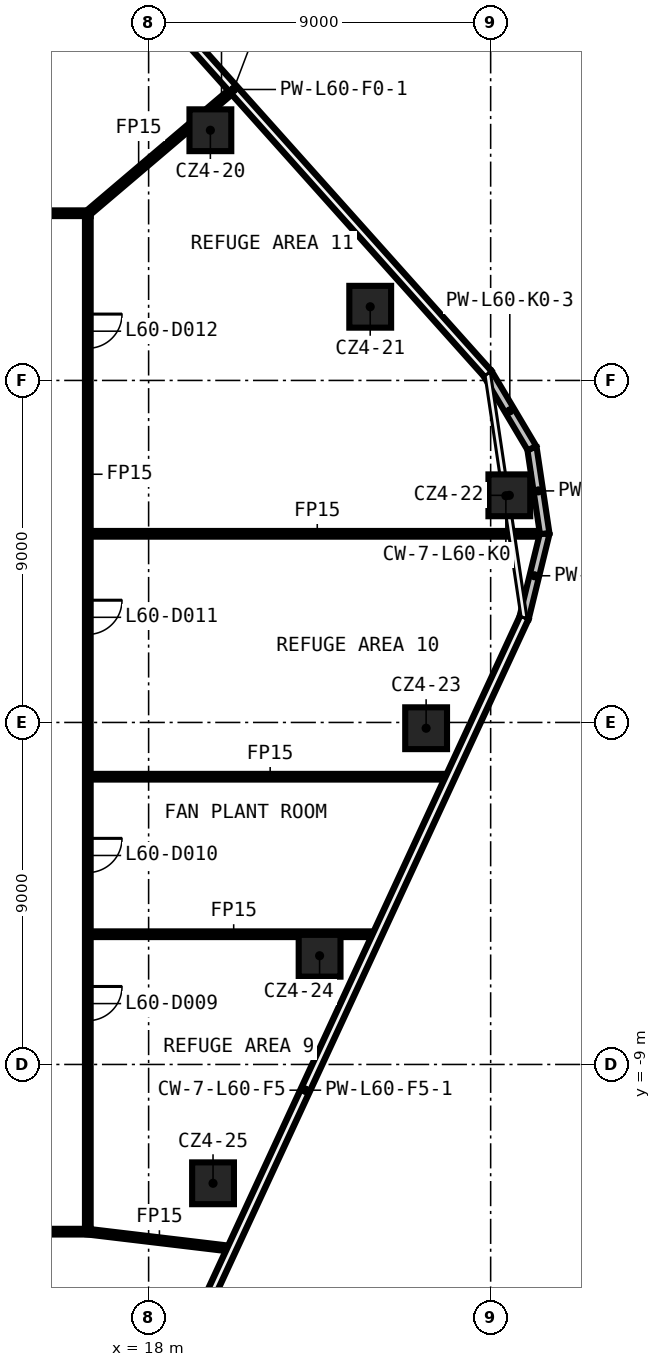
"""IFC4 building model, lengths in metres.
Left out: names, types, materials, properties, quantities, classifications, styles, units other than length and angle.
Written with IfcOpenShell. Run it as: python <this file> out.ifc"""

import sys

from ifc_helpers import new_model, si_unit, direction, frame, frame_2d, origin, origin_2d, place, context, subcontext, project, spatial, rectangle, extrude, element, fill, save


model = new_model("IFC4")
c1 = context("Model", 3, precision=1e-05, world=origin(), true_north=direction((0.0, 1.0)))
c2 = subcontext(c1, "Body", "Model", "MODEL_VIEW")
j1 = project(units=[si_unit("LENGTHUNIT", "METRE"), si_unit("PLANEANGLEUNIT", "RADIAN")], contexts=[c1])
p1 = place(None, origin())
s1 = spatial("IfcSite", under=j1, at=p1, CompositionType="ELEMENT")
p2 = place(p1, origin())
s2 = spatial("IfcBuilding", under=s1, at=p2, CompositionType="ELEMENT")
p3 = place(p2, frame((0.0, 0.0, 283.2)))
s3 = spatial("IfcBuildingStorey", under=s2, at=p3, CompositionType="ELEMENT", Elevation=283.2)
for number, where, z_axis, x_axis in (
    (1, (19.625, 15.584, 0.0), (0.0, 0.0, 1.0), (1.0, 0.0, 0.0)),
    (2, (23.831, 10.939, 0.0), (0.0, 0.0, 1.0), (1.0, 0.0, 0.0)),
    (3, (27.492, 5.977, 0.0), (0.0, 0.0, 1.0), (1.0, 0.0, 0.0)),
    (4, (25.302, -0.152, 0.0), (0.0, 0.0, 1.0), (1.0, 0.0, 0.0)),
    (5, (22.499, -6.139, 0.0), (0.0, 0.0, 1.0), (1.0, 0.0, 0.0)),
    (6, (19.695, -12.127, 0.0), (0.0, 0.0, 1.0), (1.0, 0.0, 0.0)),
):
    element("IfcColumn", number, at=place(p3, frame(where, z_axis=z_axis, x_axis=x_axis)), inside=s3, PredefinedType="COLUMN", context=c2, shape_type="SweptSolid", body=[
        extrude(rectangle(XDim=1.1, YDim=1.1, at=origin_2d()), origin(), (0.0, 0.0, 1.0), 5.55),
    ])
p4 = place(p3, frame((16.475, -13.4, 0.0), z_axis=(0.0, 0.0, 1.0), x_axis=(-1.0, 0.0, 0.0)))
e7 = element("IfcWall", 7, at=p4, inside=s3, PredefinedType="PARTITIONING", context=c2, shape_type="SweptSolid", body=[
    extrude(rectangle(XDim=32.95, YDim=0.15, at=frame_2d((16.475, 0.0))), origin(), (0.0, 0.0, 1.0), 5.55),
])
p5 = place(p4, frame((30.159, 0.0, 0.0)))
e8 = element("IfcOpeningElement", 8, at=p5, cuts=e7, PredefinedType="OPENING", context=c2, shape_type="SweptSolid", body=[
    extrude(rectangle(XDim=0.9, YDim=2.1, at=frame_2d((0.45, 1.05))), frame((0.0, 0.085, 0.0), z_axis=(0.0, -1.0, 0.0), x_axis=(1.0, 0.0, 0.0)), (0.0, 0.0, 1.0), 0.17),
])
p6 = place(p4, frame((24.091, 0.0, 0.0)))
e9 = element("IfcOpeningElement", 9, at=p6, cuts=e7, PredefinedType="OPENING", context=c2, shape_type="SweptSolid", body=[
    extrude(rectangle(XDim=0.9, YDim=2.1, at=frame_2d((0.45, 1.05))), frame((0.0, 0.085, 0.0), z_axis=(0.0, -1.0, 0.0), x_axis=(1.0, 0.0, 0.0)), (0.0, 0.0, 1.0), 0.17),
])
p7 = place(p4, frame((17.454, 0.0, 0.0)))
e10 = element("IfcOpeningElement", 10, at=p7, cuts=e7, PredefinedType="OPENING", context=c2, shape_type="SweptSolid", body=[
    extrude(rectangle(XDim=0.9, YDim=2.1, at=frame_2d((0.45, 1.05))), frame((0.0, 0.085, 0.0), z_axis=(0.0, -1.0, 0.0), x_axis=(1.0, 0.0, 0.0)), (0.0, 0.0, 1.0), 0.17),
])
p8 = place(p4, frame((12.504, 0.0, 0.0)))
e11 = element("IfcOpeningElement", 11, at=p8, cuts=e7, PredefinedType="OPENING", context=c2, shape_type="SweptSolid", body=[
    extrude(rectangle(XDim=0.9, YDim=2.1, at=frame_2d((0.45, 1.05))), frame((0.0, 0.085, 0.0), z_axis=(0.0, -1.0, 0.0), x_axis=(1.0, 0.0, 0.0)), (0.0, 0.0, 1.0), 0.17),
])
p9 = place(p4, frame((7.554, 0.0, 0.0)))
e12 = element("IfcOpeningElement", 12, at=p9, cuts=e7, PredefinedType="OPENING", context=c2, shape_type="SweptSolid", body=[
    extrude(rectangle(XDim=0.9, YDim=2.1, at=frame_2d((0.45, 1.05))), frame((0.0, 0.085, 0.0), z_axis=(0.0, -1.0, 0.0), x_axis=(1.0, 0.0, 0.0)), (0.0, 0.0, 1.0), 0.17),
])
p10 = place(p4, frame((2.438, 0.0, 0.0)))
e13 = element("IfcOpeningElement", 13, at=p10, cuts=e7, PredefinedType="OPENING", context=c2, shape_type="SweptSolid", body=[
    extrude(rectangle(XDim=0.9, YDim=2.1, at=frame_2d((0.45, 1.05))), frame((0.0, 0.085, 0.0), z_axis=(0.0, -1.0, 0.0), x_axis=(1.0, 0.0, 0.0)), (0.0, 0.0, 1.0), 0.17),
])
p11 = place(p3, frame((16.475, -5.573, 0.0), z_axis=(0.0, 0.0, 1.0), x_axis=(1.0, 0.0, 0.0)))
e14 = element("IfcWall", 14, at=p11, inside=s3, PredefinedType="PARTITIONING", context=c2, shape_type="SweptSolid", body=[
    extrude(rectangle(XDim=7.527, YDim=0.15, at=frame_2d((3.763, 0.0))), origin(), (0.0, 0.0, 1.0), 5.55),
])
p12 = place(p3, frame((16.475, -1.428, 0.0), z_axis=(0.0, 0.0, 1.0), x_axis=(1.0, 0.0, 0.0)))
e15 = element("IfcWall", 15, at=p12, inside=s3, PredefinedType="PARTITIONING", context=c2, shape_type="SweptSolid", body=[
    extrude(rectangle(XDim=9.447, YDim=0.15, at=frame_2d((4.723, 0.0))), origin(), (0.0, 0.0, 1.0), 5.55),
])
p13 = place(p3, frame((16.475, 4.964, 0.0), z_axis=(0.0, 0.0, 1.0), x_axis=(1.0, 0.0, 0.0)))
e16 = element("IfcWall", 16, at=p13, inside=s3, PredefinedType="PARTITIONING", context=c2, shape_type="SweptSolid", body=[
    extrude(rectangle(XDim=11.925, YDim=0.15, at=frame_2d((5.963, 0.0))), origin(), (0.0, 0.0, 1.0), 5.55),
])
p14 = place(p3, frame((-16.475, 13.4, 0.0), z_axis=(0.0, 0.0, 1.0), x_axis=(1.0, 0.0, 0.0)))
e17 = element("IfcWall", 17, at=p14, inside=s3, PredefinedType="PARTITIONING", context=c2, shape_type="SweptSolid", body=[
    extrude(rectangle(XDim=32.95, YDim=0.15, at=frame_2d((16.475, 0.0))), origin(), (0.0, 0.0, 1.0), 5.55),
])
p15 = place(p14, frame((23.297, 0.0, 0.0)))
e18 = element("IfcOpeningElement", 18, at=p15, cuts=e17, PredefinedType="OPENING", context=c2, shape_type="SweptSolid", body=[
    extrude(rectangle(XDim=0.9, YDim=2.1, at=frame_2d((0.45, 1.05))), frame((0.0, 0.085, 0.0), z_axis=(0.0, -1.0, 0.0), x_axis=(1.0, 0.0, 0.0)), (0.0, 0.0, 1.0), 0.17),
])
p16 = place(p14, frame((17.452, 0.0, 0.0)))
e19 = element("IfcOpeningElement", 19, at=p16, cuts=e17, PredefinedType="OPENING", context=c2, shape_type="SweptSolid", body=[
    extrude(rectangle(XDim=0.9, YDim=2.1, at=frame_2d((0.45, 1.05))), frame((0.0, 0.085, 0.0), z_axis=(0.0, -1.0, 0.0), x_axis=(1.0, 0.0, 0.0)), (0.0, 0.0, 1.0), 0.17),
])
p17 = place(p14, frame((14.179, 0.0, 0.0)))
e20 = element("IfcOpeningElement", 20, at=p17, cuts=e17, PredefinedType="OPENING", context=c2, shape_type="SweptSolid", body=[
    extrude(rectangle(XDim=0.9, YDim=2.1, at=frame_2d((0.45, 1.05))), frame((0.0, 0.085, 0.0), z_axis=(0.0, -1.0, 0.0), x_axis=(1.0, 0.0, 0.0)), (0.0, 0.0, 1.0), 0.17),
])
p18 = place(p14, frame((7.517, 0.0, 0.0)))
e21 = element("IfcOpeningElement", 21, at=p18, cuts=e17, PredefinedType="OPENING", context=c2, shape_type="SweptSolid", body=[
    extrude(rectangle(XDim=0.9, YDim=2.1, at=frame_2d((0.45, 1.05))), frame((0.0, 0.085, 0.0), z_axis=(0.0, -1.0, 0.0), x_axis=(1.0, 0.0, 0.0)), (0.0, 0.0, 1.0), 0.17),
])
p19 = place(p3, frame((16.4, 13.4, 0.0), z_axis=(0.0, 0.0, 1.0), x_axis=(0.761994228547, 0.647583813618, 0.0)))
e22 = element("IfcWall", 22, at=p19, inside=s3, PredefinedType="PARTITIONING", context=c2, shape_type="SweptSolid", body=[
    extrude(rectangle(XDim=3.51, YDim=0.15, at=frame_2d((1.755, 0.0))), origin(), (0.0, 0.0, 1.0), 5.55),
])
p20 = place(p3, frame((19.617, 16.134, 0.0), z_axis=(0.0, 0.0, 1.0), x_axis=(0.762069188158, 0.647495600341, 0.0)))
e23 = element("IfcWall", 23, at=p20, inside=s3, PredefinedType="PARTITIONING", context=c2, shape_type="SweptSolid", body=[
    extrude(rectangle(XDim=0.788, YDim=0.15, at=frame_2d((0.394, 0.0))), origin(), (0.0, 0.0, 1.0), 5.55),
])
p21 = place(p3, frame((16.4, 13.325, 0.0), z_axis=(0.0, 0.0, 1.0), x_axis=(0.0, -1.0, 0.0)))
e24 = element("IfcWall", 24, at=p21, inside=s3, PredefinedType="PARTITIONING", context=c2, shape_type="SweptSolid", body=[
    extrude(rectangle(XDim=26.65, YDim=0.15, at=frame_2d((13.325, 0.0))), origin(), (0.0, 0.0, 1.0), 5.55),
])
p22 = place(p21, frame((20.273, 0.0, 0.0)))
e25 = element("IfcOpeningElement", 25, at=p22, cuts=e24, PredefinedType="OPENING", context=c2, shape_type="SweptSolid", body=[
    extrude(rectangle(XDim=0.9, YDim=2.1, at=frame_2d((0.45, 1.05))), frame((0.0, 0.085, 0.0), z_axis=(0.0, -1.0, 0.0), x_axis=(1.0, 0.0, 0.0)), (0.0, 0.0, 1.0), 0.17),
])
p23 = place(p21, frame((16.375, 0.0, 0.0)))
e26 = element("IfcOpeningElement", 26, at=p23, cuts=e24, PredefinedType="OPENING", context=c2, shape_type="SweptSolid", body=[
    extrude(rectangle(XDim=0.9, YDim=2.1, at=frame_2d((0.45, 1.05))), frame((0.0, 0.085, 0.0), z_axis=(0.0, -1.0, 0.0), x_axis=(1.0, 0.0, 0.0)), (0.0, 0.0, 1.0), 0.17),
])
p24 = place(p21, frame((10.108, 0.0, 0.0)))
e27 = element("IfcOpeningElement", 27, at=p24, cuts=e24, PredefinedType="OPENING", context=c2, shape_type="SweptSolid", body=[
    extrude(rectangle(XDim=0.9, YDim=2.1, at=frame_2d((0.45, 1.05))), frame((0.0, 0.085, 0.0), z_axis=(0.0, -1.0, 0.0), x_axis=(1.0, 0.0, 0.0)), (0.0, 0.0, 1.0), 0.17),
])
p25 = place(p21, frame((2.579, 0.0, 0.0)))
e28 = element("IfcOpeningElement", 28, at=p25, cuts=e24, PredefinedType="OPENING", context=c2, shape_type="SweptSolid", body=[
    extrude(rectangle(XDim=0.9, YDim=2.1, at=frame_2d((0.45, 1.05))), frame((0.0, 0.085, 0.0), z_axis=(0.0, -1.0, 0.0), x_axis=(1.0, 0.0, 0.0)), (0.0, 0.0, 1.0), 0.17),
])
p26 = place(p3, frame((16.4, -13.4, 0.0), z_axis=(0.0, 0.0, 1.0), x_axis=(0.992945775756, -0.118569331652, 0.0)))
e29 = element("IfcWall", 29, at=p26, inside=s3, PredefinedType="PARTITIONING", context=c2, shape_type="SweptSolid", body=[
    extrude(rectangle(XDim=3.795, YDim=0.15, at=frame_2d((1.897, 0.0))), origin(), (0.0, 0.0, 1.0), 5.55),
])
p27 = place(p3, frame((27.88, 2.751, 0.0), z_axis=(0.0, 0.0, 1.0), x_axis=(0.237500178982, 0.971387494764, 0.0)))
e30 = element("IfcWall", 30, at=p27, inside=s3, PredefinedType="SOLIDWALL", context=c2, shape_type="SweptSolid", body=[
    extrude(rectangle(XDim=2.283, YDim=0.25, at=frame_2d((1.142, 0.0))), origin(), (0.0, 0.0, 1.0), 5.55),
])
p28 = place(p3, frame((28.422, 4.969, 0.0), z_axis=(0.0, 0.0, 1.0), x_axis=(-0.147358250541, 0.989083184569, 0.0)))
e31 = element("IfcWall", 31, at=p28, inside=s3, PredefinedType="SOLIDWALL", context=c2, shape_type="SweptSolid", body=[
    extrude(rectangle(XDim=2.273, YDim=0.25, at=frame_2d((1.137, 0.0))), origin(), (0.0, 0.0, 1.0), 5.55),
])
p29 = place(p3, frame((28.087, 7.217, 0.0), z_axis=(0.0, 0.0, 1.0), x_axis=(-0.510590635496, 0.859823937178, 0.0)))
e32 = element("IfcWall", 32, at=p29, inside=s3, PredefinedType="SOLIDWALL", context=c2, shape_type="SweptSolid", body=[
    extrude(rectangle(XDim=2.283, YDim=0.25, at=frame_2d((1.142, 0.0))), origin(), (0.0, 0.0, 1.0), 5.55),
])
p30 = place(p3, frame((26.921, 9.18, 0.0), z_axis=(0.0, 0.0, 1.0), x_axis=(-0.666670693315, 0.745352390936, 0.0)))
e33 = element("IfcWall", 33, at=p30, inside=s3, PredefinedType="SOLIDWALL", context=c2, shape_type="SweptSolid", body=[
    extrude(rectangle(XDim=20.06, YDim=0.25, at=frame_2d((10.03, 0.0))), origin(), (0.0, 0.0, 1.0), 5.55),
])
p31 = place(p3, frame((16.366, -22.105, 0.0), z_axis=(0.0, 0.0, 1.0), x_axis=(0.420298344407, 0.907385971728, 0.0)))
e34 = element("IfcWall", 34, at=p31, inside=s3, PredefinedType="SOLIDWALL", context=c2, shape_type="SweptSolid", body=[
    extrude(rectangle(XDim=27.394, YDim=0.25, at=frame_2d((13.697, 0.0))), origin(), (0.0, 0.0, 1.0), 5.55),
])
p32 = place(p22, origin())
e35 = element("IfcDoor", 35, at=p32, inside=s3, OperationType="SINGLE_SWING_RIGHT", PredefinedType="DOOR", context=c2, shape_type="SweptSolid", body=[
    extrude(rectangle(XDim=0.9, YDim=2.1, at=frame_2d((0.45, 1.05))), frame((0.0, 0.025, 0.0), z_axis=(0.0, -1.0, 0.0), x_axis=(1.0, 0.0, 0.0)), (0.0, 0.0, 1.0), 0.05),
])
fill(e25, e35)
p33 = place(p23, origin())
e36 = element("IfcDoor", 36, at=p33, inside=s3, OperationType="SINGLE_SWING_LEFT", PredefinedType="DOOR", context=c2, shape_type="SweptSolid", body=[
    extrude(rectangle(XDim=0.9, YDim=2.1, at=frame_2d((0.45, 1.05))), frame((0.0, 0.025, 0.0), z_axis=(0.0, -1.0, 0.0), x_axis=(1.0, 0.0, 0.0)), (0.0, 0.0, 1.0), 0.05),
])
fill(e26, e36)
p34 = place(p24, origin())
e37 = element("IfcDoor", 37, at=p34, inside=s3, OperationType="SINGLE_SWING_RIGHT", PredefinedType="DOOR", context=c2, shape_type="SweptSolid", body=[
    extrude(rectangle(XDim=0.9, YDim=2.1, at=frame_2d((0.45, 1.05))), frame((0.0, 0.025, 0.0), z_axis=(0.0, -1.0, 0.0), x_axis=(1.0, 0.0, 0.0)), (0.0, 0.0, 1.0), 0.05),
])
fill(e27, e37)
p35 = place(p25, origin())
e38 = element("IfcDoor", 38, at=p35, inside=s3, OperationType="SINGLE_SWING_LEFT", PredefinedType="DOOR", context=c2, shape_type="SweptSolid", body=[
    extrude(rectangle(XDim=0.9, YDim=2.1, at=frame_2d((0.45, 1.05))), frame((0.0, 0.025, 0.0), z_axis=(0.0, -1.0, 0.0), x_axis=(1.0, 0.0, 0.0)), (0.0, 0.0, 1.0), 0.05),
])
fill(e28, e38)
save(model, sys.argv[1])
